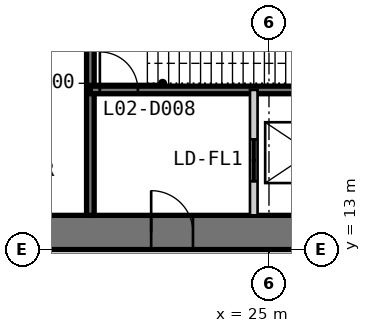
"""IFC4 building model, lengths in metres.
Left out: names, types, materials, properties, quantities, classifications, styles, units other than length and angle.
Written with IfcOpenShell. Run it as: python <this file> out.ifc"""

import sys

from ifc_helpers import new_model, si_unit, direction, frame, frame_2d, origin, place, context, subcontext, project, spatial, polyline, rectangle, outline, extrude, element, fill, save


model = new_model("IFC4")
c1 = context("Model", 3, precision=1e-05, world=origin(), true_north=direction((0.0, 1.0)))
c2 = subcontext(c1, "Body", "Model", "MODEL_VIEW")
j1 = project(units=[si_unit("LENGTHUNIT", "METRE"), si_unit("PLANEANGLEUNIT", "RADIAN")], contexts=[c1])
p1 = place(None, origin())
s1 = spatial("IfcSite", under=j1, at=p1, CompositionType="ELEMENT")
p2 = place(p1, origin())
s2 = spatial("IfcBuilding", under=s1, at=p2, CompositionType="ELEMENT")
p3 = place(p2, frame((0.0, 0.0, 11.8)))
s3 = spatial("IfcBuildingStorey", under=s2, at=p3, CompositionType="ELEMENT", Elevation=11.8)
p4 = place(p3, frame((13.0, 13.45, 0.0), z_axis=(0.0, 0.0, 1.0), x_axis=(1.0, 0.0, 0.0)))
e1 = element("IfcWall", 1, at=p4, inside=s3, PredefinedType="SHEAR", context=c2, shape_type="SweptSolid", body=[
    extrude(outline(polyline([(0.0, -0.45), (24.0, -0.45), (23.1, 0.45), (0.9, 0.45), (0.0, -0.45)])), origin(), (0.0, 0.0, 1.0), 4.8),
])
p5 = place(p4, frame((4.9, 0.0, 0.0)))
e2 = element("IfcOpeningElement", 2, at=p5, cuts=e1, PredefinedType="OPENING", context=c2, shape_type="SweptSolid", body=[
    extrude(rectangle(XDim=1.0, YDim=2.2, at=frame_2d((0.5, 1.1))), frame((0.0, 0.46, 0.0), z_axis=(0.0, -1.0, 0.0), x_axis=(1.0, 0.0, 0.0)), (0.0, 0.0, 1.0), 0.92),
])
p6 = place(p4, frame((8.9, 0.0, 0.0)))
e3 = element("IfcOpeningElement", 3, at=p6, cuts=e1, PredefinedType="OPENING", context=c2, shape_type="SweptSolid", body=[
    extrude(rectangle(XDim=1.1, YDim=2.2, at=frame_2d((0.55, 1.1))), frame((0.0, 0.46, 0.0), z_axis=(0.0, -1.0, 0.0), x_axis=(1.0, 0.0, 0.0)), (0.0, 0.0, 1.0), 0.92),
])
p7 = place(p4, frame((15.05, 0.0, 0.0)))
e4 = element("IfcOpeningElement", 4, at=p7, cuts=e1, PredefinedType="OPENING", context=c2, shape_type="SweptSolid", body=[
    extrude(rectangle(XDim=0.9, YDim=2.2, at=frame_2d((0.45, 1.1))), frame((0.0, 0.46, 0.0), z_axis=(0.0, -1.0, 0.0), x_axis=(1.0, 0.0, 0.0)), (0.0, 0.0, 1.0), 0.92),
])
p8 = place(p4, frame((17.9, 0.0, 0.0)))
e5 = element("IfcOpeningElement", 5, at=p8, cuts=e1, PredefinedType="OPENING", context=c2, shape_type="SweptSolid", body=[
    extrude(rectangle(XDim=1.0, YDim=2.2, at=frame_2d((0.5, 1.1))), frame((0.0, 0.46, 0.0), z_axis=(0.0, -1.0, 0.0), x_axis=(1.0, 0.0, 0.0)), (0.0, 0.0, 1.0), 0.92),
])
p9 = place(p4, frame((21.4, 0.0, 0.0)))
e6 = element("IfcOpeningElement", 6, at=p9, cuts=e1, PredefinedType="OPENING", context=c2, shape_type="SweptSolid", body=[
    extrude(rectangle(XDim=1.0, YDim=2.2, at=frame_2d((0.5, 1.1))), frame((0.0, 0.46, 0.0), z_axis=(0.0, -1.0, 0.0), x_axis=(1.0, 0.0, 0.0)), (0.0, 0.0, 1.0), 0.92),
])
p10 = place(p3, frame((20.3, 13.9, 0.0), z_axis=(0.0, 0.0, 1.0), x_axis=(0.0, 1.0, 0.0)))
e7 = element("IfcWall", 7, at=p10, inside=s3, PredefinedType="SOLIDWALL", context=c2, shape_type="SweptSolid", body=[
    extrude(rectangle(XDim=16.1, YDim=0.2, at=frame_2d((8.05, 0.0))), origin(), (0.0, 0.0, 1.0), 4.6),
])
p11 = place(p3, frame((20.3, 17.2, 0.0), z_axis=(0.0, 0.0, 1.0), x_axis=(1.0, 0.0, 0.0)))
e8 = element("IfcWall", 8, at=p11, inside=s3, PredefinedType="SOLIDWALL", context=c2, shape_type="SweptSolid", body=[
    extrude(rectangle(XDim=9.4, YDim=0.2, at=frame_2d((4.7, 0.0))), origin(), (0.0, 0.0, 1.0), 4.6),
])
p12 = place(p11, frame((0.25, 0.0, 0.0)))
e9 = element("IfcOpeningElement", 9, at=p12, cuts=e8, PredefinedType="OPENING", context=c2, shape_type="SweptSolid", body=[
    extrude(rectangle(XDim=1.0, YDim=2.2, at=frame_2d((0.5, 1.1))), frame((0.0, 0.11, 0.0), z_axis=(0.0, -1.0, 0.0), x_axis=(1.0, 0.0, 0.0)), (0.0, 0.0, 1.0), 0.22),
])
p13 = place(p3, frame((24.6, 13.9, 0.0), z_axis=(0.0, 0.0, 1.0), x_axis=(0.0, 1.0, 0.0)))
e10 = element("IfcWall", 10, at=p13, inside=s3, PredefinedType="PARTITIONING", context=c2, shape_type="SweptSolid", body=[
    extrude(rectangle(XDim=3.3, YDim=0.2, at=frame_2d((1.65, 0.0))), origin(), (0.0, 0.0, 1.0), 4.6),
])
p14 = place(p13, frame((0.9, 0.0, 0.0)))
e11 = element("IfcOpeningElement", 11, at=p14, cuts=e10, PredefinedType="OPENING", context=c2, shape_type="SweptSolid", body=[
    extrude(rectangle(XDim=1.1, YDim=2.2, at=frame_2d((0.55, 1.1))), frame((0.0, 0.11, 0.0), z_axis=(0.0, -1.0, 0.0), x_axis=(1.0, 0.0, 0.0)), (0.0, 0.0, 1.0), 0.22),
])
p15 = place(p6, origin())
e12 = element("IfcDoor", 12, at=p15, inside=s3, OperationType="SINGLE_SWING_LEFT", PredefinedType="DOOR", context=c2, shape_type="SweptSolid", body=[
    extrude(rectangle(XDim=1.1, YDim=2.2, at=frame_2d((0.55, 1.1))), frame((0.0, 0.025, 0.0), z_axis=(0.0, -1.0, 0.0), x_axis=(1.0, 0.0, 0.0)), (0.0, 0.0, 1.0), 0.05),
    extrude(outline(polyline([(0.0, 0.0), (0.04, 0.0), (0.04, 2.16), (1.06, 2.16), (1.06, 0.0), (1.1, 0.0), (1.1, 2.2), (0.0, 2.2), (0.0, 0.0)])), frame((0.0, 0.3, 0.0), z_axis=(0.0, -1.0, 0.0), x_axis=(1.0, 0.0, 0.0)), (0.0, 0.0, 1.0), 0.6),
])
fill(e3, e12)
p16 = place(p12, origin())
e13 = element("IfcDoor", 13, at=p16, inside=s3, OperationType="SINGLE_SWING_LEFT", PredefinedType="DOOR", context=c2, shape_type="SweptSolid", body=[
    extrude(rectangle(XDim=1.0, YDim=2.2, at=frame_2d((0.5, 1.1))), frame((0.0, 0.025, 0.0), z_axis=(0.0, -1.0, 0.0), x_axis=(1.0, 0.0, 0.0)), (0.0, 0.0, 1.0), 0.05),
])
fill(e9, e13)
p17 = place(p14, origin())
e14 = element("IfcDoor", 14, at=p17, inside=s3, OperationType="DOUBLE_DOOR_SLIDING", PredefinedType="DOOR", context=c2, shape_type="SweptSolid", body=[
    extrude(rectangle(XDim=1.1, YDim=2.2, at=frame_2d((0.55, 1.1))), frame((0.0, 0.025, 0.0), z_axis=(0.0, -1.0, 0.0), x_axis=(1.0, 0.0, 0.0)), (0.0, 0.0, 1.0), 0.05),
])
fill(e11, e14)
save(model, sys.argv[1])
